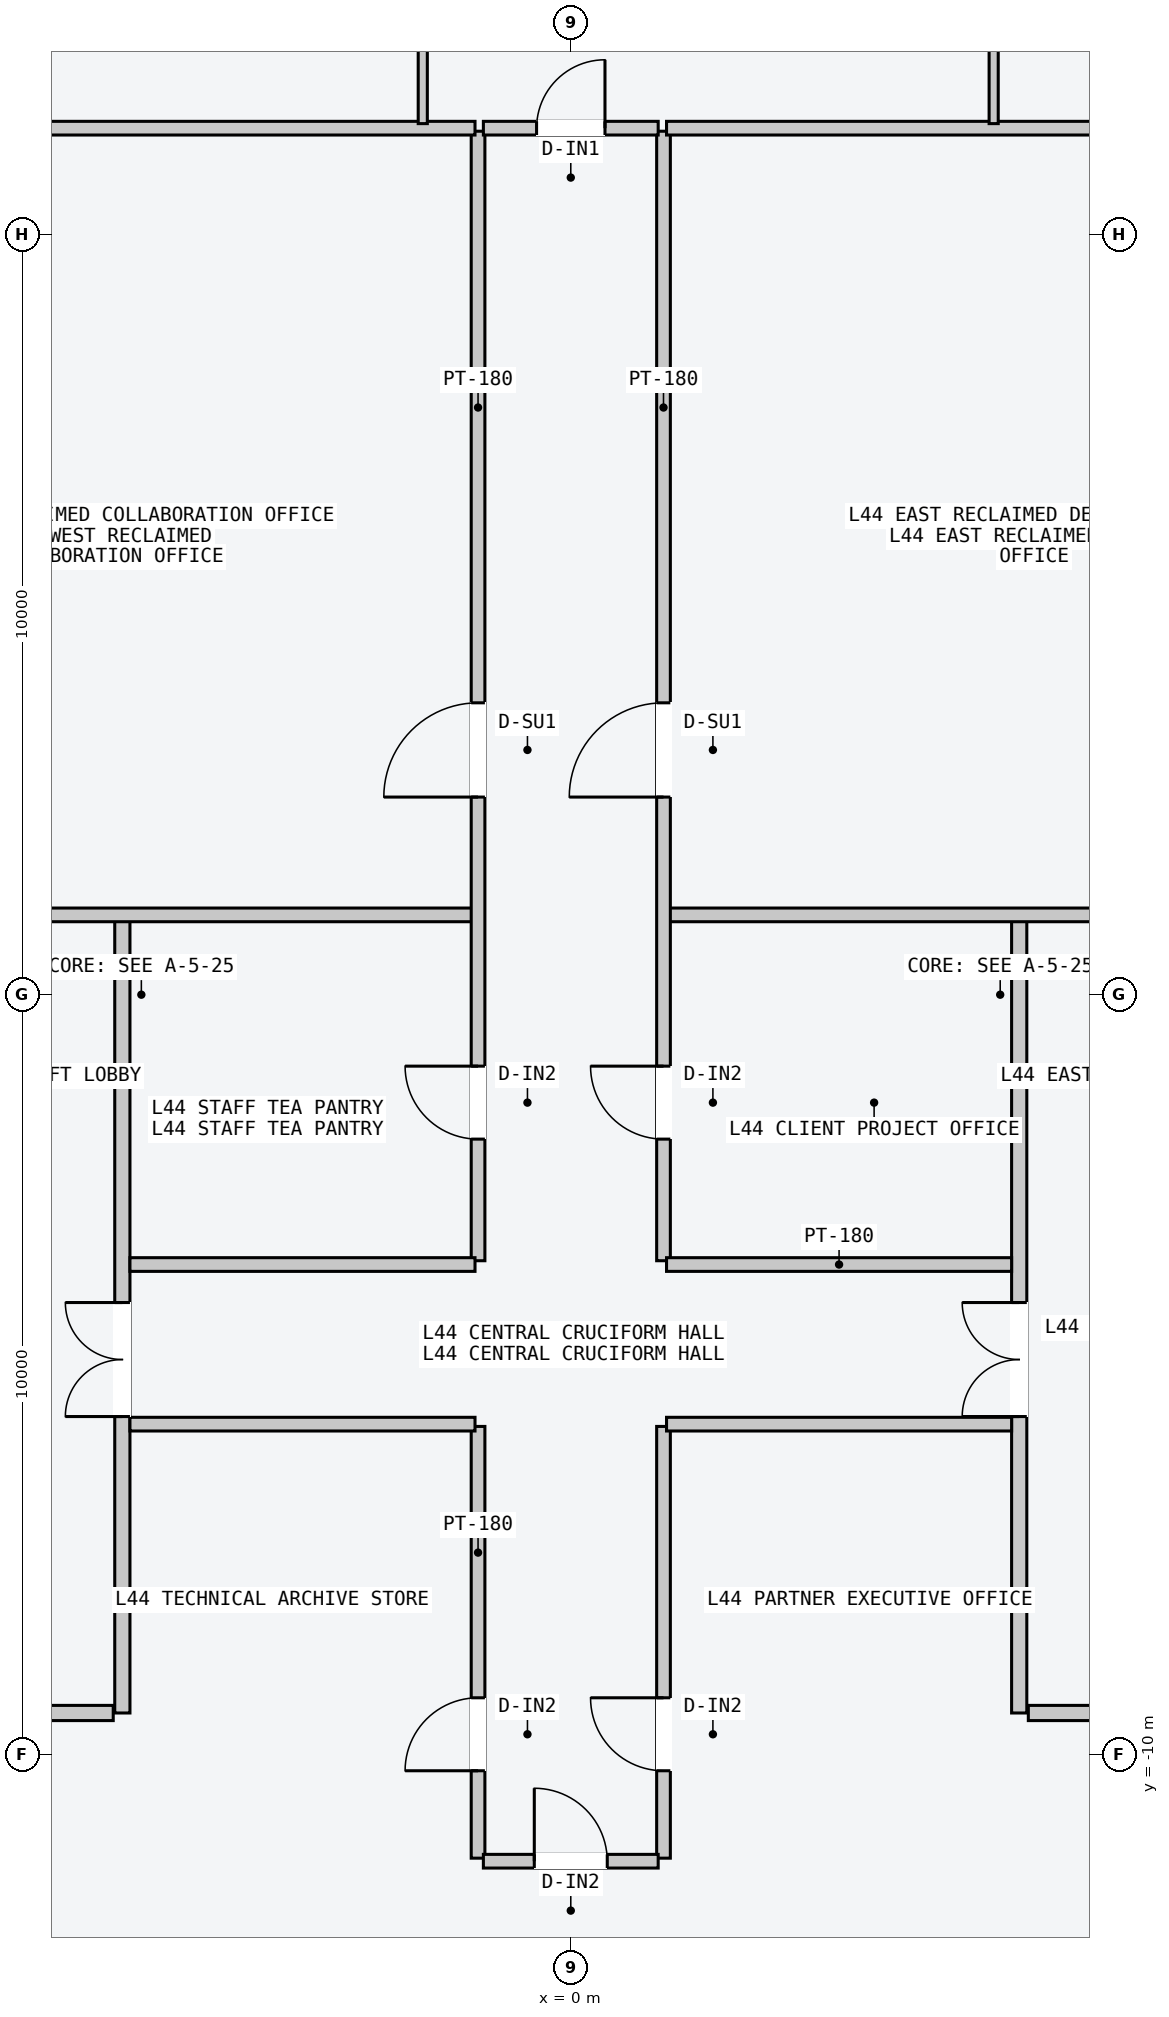
"""IFC4 building model, lengths in metres.
Left out: names, types, materials, properties, quantities, classifications, styles, units other than length and angle.
Written with IfcOpenShell. Run it as: python <this file> out.ifc"""

import sys

from ifc_helpers import new_model, si_unit, direction, frame, frame_2d, origin, place, context, subcontext, project, spatial, rectangle, extrude, element, fill, save


model = new_model("IFC4")
c1 = context("Model", 3, precision=1e-05, world=origin(), true_north=direction((0.0, 1.0)))
c2 = subcontext(c1, "Body", "Model", "MODEL_VIEW")
j1 = project(units=[si_unit("LENGTHUNIT", "METRE"), si_unit("PLANEANGLEUNIT", "RADIAN")], contexts=[c1])
p1 = place(None, origin())
s1 = spatial("IfcSite", under=j1, at=p1, CompositionType="ELEMENT")
p2 = place(p1, origin())
s2 = spatial("IfcBuilding", under=s1, at=p2, CompositionType="ELEMENT")
p3 = place(p2, frame((0.0, 0.0, 169.5)))
s3 = spatial("IfcBuildingStorey", under=s2, at=p3, CompositionType="ELEMENT", Elevation=169.5)
p4 = place(p3, frame((-5.9, -9.45, 0.0), z_axis=(0.0, 0.0, 1.0), x_axis=(0.0, 1.0, 0.0)))
e1 = element("IfcWall", 1, at=p4, inside=s3, PredefinedType="PARTITIONING", context=c2, shape_type="SweptSolid", body=[
    extrude(rectangle(XDim=10.5, YDim=0.2, at=frame_2d((5.25, 0.0))), origin(), (0.0, 0.0, 1.0), 3.4),
])
p5 = place(p4, frame((3.9, 0.0, 0.0)))
e2 = element("IfcOpeningElement", 2, at=p5, cuts=e1, PredefinedType="OPENING", context=c2, shape_type="SweptSolid", body=[
    extrude(rectangle(XDim=1.5, YDim=2.2, at=frame_2d((0.75, 1.1))), frame((0.0, 0.11, 0.0), z_axis=(0.0, -1.0, 0.0), x_axis=(1.0, 0.0, 0.0)), (0.0, 0.0, 1.0), 0.22),
])
p6 = place(p3, frame((-6.02, -9.45, 0.0), z_axis=(0.0, 0.0, 1.0), x_axis=(-1.0, 0.0, 0.0)))
e3 = element("IfcWall", 3, at=p6, inside=s3, PredefinedType="PARTITIONING", context=c2, shape_type="SweptSolid", body=[
    extrude(rectangle(XDim=1.8, YDim=0.2, at=frame_2d((0.9, 0.0))), origin(), (0.0, 0.0, 1.0), 3.4),
])
p7 = place(p3, frame((5.9, -9.45, 0.0), z_axis=(0.0, 0.0, 1.0), x_axis=(0.0, 1.0, 0.0)))
e4 = element("IfcWall", 4, at=p7, inside=s3, PredefinedType="PARTITIONING", context=c2, shape_type="SweptSolid", body=[
    extrude(rectangle(XDim=10.5, YDim=0.2, at=frame_2d((5.25, 0.0))), origin(), (0.0, 0.0, 1.0), 3.4),
])
p8 = place(p7, frame((3.9, 0.0, 0.0)))
e5 = element("IfcOpeningElement", 5, at=p8, cuts=e4, PredefinedType="OPENING", context=c2, shape_type="SweptSolid", body=[
    extrude(rectangle(XDim=1.5, YDim=2.2, at=frame_2d((0.75, 1.1))), frame((0.0, 0.11, 0.0), z_axis=(0.0, -1.0, 0.0), x_axis=(1.0, 0.0, 0.0)), (0.0, 0.0, 1.0), 0.22),
])
p9 = place(p3, frame((6.02, -9.45, 0.0), z_axis=(0.0, 0.0, 1.0), x_axis=(1.0, 0.0, 0.0)))
e6 = element("IfcWall", 6, at=p9, inside=s3, PredefinedType="PARTITIONING", context=c2, shape_type="SweptSolid", body=[
    extrude(rectangle(XDim=1.8, YDim=0.2, at=frame_2d((0.9, 0.0))), origin(), (0.0, 0.0, 1.0), 3.4),
])
p10 = place(p3, frame((-10.05, 1.05, 0.0), z_axis=(0.0, 0.0, 1.0), x_axis=(1.0, 0.0, 0.0)))
e7 = element("IfcWall", 7, at=p10, inside=s3, PredefinedType="PARTITIONING", context=c2, shape_type="SweptSolid", body=[
    extrude(rectangle(XDim=8.79, YDim=0.18, at=frame_2d((4.395, 0.0))), origin(), (0.0, 0.0, 1.0), 3.4),
])
p11 = place(p3, frame((-1.22, -3.5, 0.0), z_axis=(0.0, 0.0, 1.0), x_axis=(0.0, 1.0, 0.0)))
e8 = element("IfcWall", 8, at=p11, inside=s3, PredefinedType="PARTITIONING", context=c2, shape_type="SweptSolid", body=[
    extrude(rectangle(XDim=14.86, YDim=0.18, at=frame_2d((7.43, 0.0))), origin(), (0.0, 0.0, 1.0), 3.4),
])
p12 = place(p11, frame((6.1, 0.0, 0.0)))
e9 = element("IfcOpeningElement", 9, at=p12, cuts=e8, PredefinedType="OPENING", context=c2, shape_type="SweptSolid", body=[
    extrude(rectangle(XDim=1.24, YDim=2.24, at=frame_2d((0.62, 1.12))), frame((0.0, 0.1, 0.0), z_axis=(0.0, -1.0, 0.0), x_axis=(1.0, 0.0, 0.0)), (0.0, 0.0, 1.0), 0.2),
])
p13 = place(p11, frame((1.6, 0.0, 0.0)))
e10 = element("IfcOpeningElement", 10, at=p13, cuts=e8, PredefinedType="OPENING", context=c2, shape_type="SweptSolid", body=[
    extrude(rectangle(XDim=0.96, YDim=2.18, at=frame_2d((0.48, 1.09))), frame((0.0, 0.1, 0.0), z_axis=(0.0, -1.0, 0.0), x_axis=(1.0, 0.0, 0.0)), (0.0, 0.0, 1.0), 0.2),
])
p14 = place(p3, frame((-7.5, 11.4, 0.0), z_axis=(0.0, 0.0, 1.0), x_axis=(1.0, 0.0, 0.0)))
e11 = element("IfcWall", 11, at=p14, inside=s3, PredefinedType="PARTITIONING", context=c2, shape_type="SweptSolid", body=[
    extrude(rectangle(XDim=6.24, YDim=0.18, at=frame_2d((3.12, 0.0))), origin(), (0.0, 0.0, 1.0), 3.4),
])
p15 = place(p3, frame((-5.8, -3.55, 0.0), z_axis=(0.0, 0.0, 1.0), x_axis=(1.0, 0.0, 0.0)))
e12 = element("IfcWall", 12, at=p15, inside=s3, PredefinedType="PARTITIONING", context=c2, shape_type="SweptSolid", body=[
    extrude(rectangle(XDim=4.54, YDim=0.18, at=frame_2d((2.27, 0.0))), origin(), (0.0, 0.0, 1.0), 3.4),
])
p16 = place(p3, frame((1.26, 1.05, 0.0), z_axis=(0.0, 0.0, 1.0), x_axis=(1.0, 0.0, 0.0)))
e13 = element("IfcWall", 13, at=p16, inside=s3, PredefinedType="PARTITIONING", context=c2, shape_type="SweptSolid", body=[
    extrude(rectangle(XDim=8.8, YDim=0.18, at=frame_2d((4.4, 0.0))), origin(), (0.0, 0.0, 1.0), 3.4),
])
p17 = place(p3, frame((1.22, -3.5, 0.0), z_axis=(0.0, 0.0, 1.0), x_axis=(0.0, 1.0, 0.0)))
e14 = element("IfcWall", 14, at=p17, inside=s3, PredefinedType="PARTITIONING", context=c2, shape_type="SweptSolid", body=[
    extrude(rectangle(XDim=14.86, YDim=0.18, at=frame_2d((7.43, 0.0))), origin(), (0.0, 0.0, 1.0), 3.4),
])
p18 = place(p17, frame((6.1, 0.0, 0.0)))
e15 = element("IfcOpeningElement", 15, at=p18, cuts=e14, PredefinedType="OPENING", context=c2, shape_type="SweptSolid", body=[
    extrude(rectangle(XDim=1.24, YDim=2.24, at=frame_2d((0.62, 1.12))), frame((0.0, 0.1, 0.0), z_axis=(0.0, -1.0, 0.0), x_axis=(1.0, 0.0, 0.0)), (0.0, 0.0, 1.0), 0.2),
])
p19 = place(p17, frame((1.6, 0.0, 0.0)))
e16 = element("IfcOpeningElement", 16, at=p19, cuts=e14, PredefinedType="OPENING", context=c2, shape_type="SweptSolid", body=[
    extrude(rectangle(XDim=0.96, YDim=2.18, at=frame_2d((0.48, 1.09))), frame((0.0, 0.1, 0.0), z_axis=(0.0, -1.0, 0.0), x_axis=(1.0, 0.0, 0.0)), (0.0, 0.0, 1.0), 0.2),
])
p20 = place(p3, frame((1.26, 11.4, 0.0), z_axis=(0.0, 0.0, 1.0), x_axis=(1.0, 0.0, 0.0)))
e17 = element("IfcWall", 17, at=p20, inside=s3, PredefinedType="PARTITIONING", context=c2, shape_type="SweptSolid", body=[
    extrude(rectangle(XDim=6.24, YDim=0.18, at=frame_2d((3.12, 0.0))), origin(), (0.0, 0.0, 1.0), 3.4),
])
p21 = place(p3, frame((1.26, -3.55, 0.0), z_axis=(0.0, 0.0, 1.0), x_axis=(1.0, 0.0, 0.0)))
e18 = element("IfcWall", 18, at=p21, inside=s3, PredefinedType="PARTITIONING", context=c2, shape_type="SweptSolid", body=[
    extrude(rectangle(XDim=4.54, YDim=0.18, at=frame_2d((2.27, 0.0))), origin(), (0.0, 0.0, 1.0), 3.4),
])
p22 = place(p3, frame((-1.22, -11.36, 0.0), z_axis=(0.0, 0.0, 1.0), x_axis=(0.0, 1.0, 0.0)))
e19 = element("IfcWall", 19, at=p22, inside=s3, PredefinedType="PARTITIONING", context=c2, shape_type="SweptSolid", body=[
    extrude(rectangle(XDim=5.68, YDim=0.18, at=frame_2d((2.84, 0.0))), origin(), (0.0, 0.0, 1.0), 3.4),
])
p23 = place(p22, frame((1.15, 0.0, 0.0)))
e20 = element("IfcOpeningElement", 20, at=p23, cuts=e19, PredefinedType="OPENING", context=c2, shape_type="SweptSolid", body=[
    extrude(rectangle(XDim=0.96, YDim=2.18, at=frame_2d((0.48, 1.09))), frame((0.0, 0.1, 0.0), z_axis=(0.0, -1.0, 0.0), x_axis=(1.0, 0.0, 0.0)), (0.0, 0.0, 1.0), 0.2),
])
p24 = place(p3, frame((1.22, -11.36, 0.0), z_axis=(0.0, 0.0, 1.0), x_axis=(0.0, 1.0, 0.0)))
e21 = element("IfcWall", 21, at=p24, inside=s3, PredefinedType="PARTITIONING", context=c2, shape_type="SweptSolid", body=[
    extrude(rectangle(XDim=5.68, YDim=0.18, at=frame_2d((2.84, 0.0))), origin(), (0.0, 0.0, 1.0), 3.4),
])
p25 = place(p24, frame((1.15, 0.0, 0.0)))
e22 = element("IfcOpeningElement", 22, at=p25, cuts=e21, PredefinedType="OPENING", context=c2, shape_type="SweptSolid", body=[
    extrude(rectangle(XDim=0.96, YDim=2.18, at=frame_2d((0.48, 1.09))), frame((0.0, 0.1, 0.0), z_axis=(0.0, -1.0, 0.0), x_axis=(1.0, 0.0, 0.0)), (0.0, 0.0, 1.0), 0.2),
])
for number, where, z_axis, x_axis in (
    (23, (-5.8, -5.65, 0.0), (0.0, 0.0, 1.0), (1.0, 0.0, 0.0)),
    (24, (1.26, -5.65, 0.0), (0.0, 0.0, 1.0), (1.0, 0.0, 0.0)),
):
    element("IfcWall", number, at=place(p3, frame(where, z_axis=z_axis, x_axis=x_axis)), inside=s3, PredefinedType="PARTITIONING", context=c2, shape_type="SweptSolid", body=[
        extrude(rectangle(XDim=4.54, YDim=0.18, at=frame_2d((2.27, 0.0))), origin(), (0.0, 0.0, 1.0), 3.4),
    ])
p26 = place(p3, frame((-1.948, 11.46, 0.0), z_axis=(0.0, 0.0, 1.0), x_axis=(0.0, 1.0, 0.0)))
e25 = element("IfcWall", 25, at=p26, inside=s3, PredefinedType="PARTITIONING", context=c2, shape_type="SweptSolid", body=[
    extrude(rectangle(XDim=7.1, YDim=0.12, at=frame_2d((3.55, 0.0))), origin(), (0.0, 0.0, 1.0), 3.4),
])
p27 = place(p26, frame((1.15, 0.0, 0.0)))
e26 = element("IfcOpeningElement", 26, at=p27, cuts=e25, PredefinedType="OPENING", context=c2, shape_type="SweptSolid", body=[
    extrude(rectangle(XDim=0.96, YDim=2.18, at=frame_2d((0.48, 1.09))), frame((0.0, 0.07, 0.0), z_axis=(0.0, -1.0, 0.0), x_axis=(1.0, 0.0, 0.0)), (0.0, 0.0, 1.0), 0.14),
])
p28 = place(p3, frame((5.564, 11.46, 0.0), z_axis=(0.0, 0.0, 1.0), x_axis=(0.0, 1.0, 0.0)))
e27 = element("IfcWall", 27, at=p28, inside=s3, PredefinedType="PARTITIONING", context=c2, shape_type="SweptSolid", body=[
    extrude(rectangle(XDim=7.1, YDim=0.12, at=frame_2d((3.55, 0.0))), origin(), (0.0, 0.0, 1.0), 3.4),
])
p29 = place(p28, frame((1.15, 0.0, 0.0)))
e28 = element("IfcOpeningElement", 28, at=p29, cuts=e27, PredefinedType="OPENING", context=c2, shape_type="SweptSolid", body=[
    extrude(rectangle(XDim=0.96, YDim=2.18, at=frame_2d((0.48, 1.09))), frame((0.0, 0.07, 0.0), z_axis=(0.0, -1.0, 0.0), x_axis=(1.0, 0.0, 0.0)), (0.0, 0.0, 1.0), 0.14),
])
p30 = place(p3, frame((-1.15, 11.4, 0.0), z_axis=(0.0, 0.0, 1.0), x_axis=(1.0, 0.0, 0.0)))
e29 = element("IfcWall", 29, at=p30, inside=s3, PredefinedType="PARTITIONING", context=c2, shape_type="SweptSolid", body=[
    extrude(rectangle(XDim=2.3, YDim=0.18, at=frame_2d((1.15, 0.0))), origin(), (0.0, 0.0, 1.0), 3.4),
])
p31 = place(p30, frame((0.7, 0.0, 0.0)))
e30 = element("IfcOpeningElement", 30, at=p31, cuts=e29, PredefinedType="OPENING", context=c2, shape_type="SweptSolid", body=[
    extrude(rectangle(XDim=0.9, YDim=2.15, at=frame_2d((0.45, 1.075))), frame((0.0, 0.1, 0.0), z_axis=(0.0, -1.0, 0.0), x_axis=(1.0, 0.0, 0.0)), (0.0, 0.0, 1.0), 0.2),
])
p32 = place(p3, frame((-1.15, -11.4, 0.0), z_axis=(0.0, 0.0, 1.0), x_axis=(1.0, 0.0, 0.0)))
e31 = element("IfcWall", 31, at=p32, inside=s3, PredefinedType="PARTITIONING", context=c2, shape_type="SweptSolid", body=[
    extrude(rectangle(XDim=2.3, YDim=0.18, at=frame_2d((1.15, 0.0))), origin(), (0.0, 0.0, 1.0), 3.4),
])
p33 = place(p32, frame((0.67, 0.0, 0.0)))
e32 = element("IfcOpeningElement", 32, at=p33, cuts=e31, PredefinedType="OPENING", context=c2, shape_type="SweptSolid", body=[
    extrude(rectangle(XDim=0.96, YDim=2.18, at=frame_2d((0.48, 1.09))), frame((0.0, 0.1, 0.0), z_axis=(0.0, -1.0, 0.0), x_axis=(1.0, 0.0, 0.0)), (0.0, 0.0, 1.0), 0.2),
])
p34 = place(p5, origin())
e33 = element("IfcDoor", 33, at=p34, inside=s3, OperationType="DOUBLE_DOOR_SINGLE_SWING", PredefinedType="DOOR", context=c2, shape_type="SweptSolid", body=[
    extrude(rectangle(XDim=1.5, YDim=2.2, at=frame_2d((0.75, 1.1))), frame((0.0, 0.025, 0.0), z_axis=(0.0, -1.0, 0.0), x_axis=(1.0, 0.0, 0.0)), (0.0, 0.0, 1.0), 0.05),
])
fill(e2, e33)
p35 = place(p8, origin())
e34 = element("IfcDoor", 34, at=p35, inside=s3, OperationType="DOUBLE_DOOR_SINGLE_SWING", PredefinedType="DOOR", context=c2, shape_type="SweptSolid", body=[
    extrude(rectangle(XDim=1.5, YDim=2.2, at=frame_2d((0.75, 1.1))), frame((0.0, 0.025, 0.0), z_axis=(0.0, -1.0, 0.0), x_axis=(1.0, 0.0, 0.0)), (0.0, 0.0, 1.0), 0.05),
])
fill(e5, e34)
p36 = place(p12, origin())
e35 = element("IfcDoor", 35, at=p36, inside=s3, OperationType="SINGLE_SWING_LEFT", PredefinedType="DOOR", context=c2, shape_type="SweptSolid", body=[
    extrude(rectangle(XDim=1.24, YDim=2.24, at=frame_2d((0.62, 1.12))), frame((0.0, 0.025, 0.0), z_axis=(0.0, -1.0, 0.0), x_axis=(1.0, 0.0, 0.0)), (0.0, 0.0, 1.0), 0.05),
])
fill(e9, e35)
p37 = place(p13, origin())
e36 = element("IfcDoor", 36, at=p37, inside=s3, OperationType="SINGLE_SWING_RIGHT", PredefinedType="DOOR", context=c2, shape_type="SweptSolid", body=[
    extrude(rectangle(XDim=0.96, YDim=2.18, at=frame_2d((0.48, 1.09))), frame((0.0, 0.025, 0.0), z_axis=(0.0, -1.0, 0.0), x_axis=(1.0, 0.0, 0.0)), (0.0, 0.0, 1.0), 0.05),
])
fill(e10, e36)
p38 = place(p18, origin())
e37 = element("IfcDoor", 37, at=p38, inside=s3, OperationType="SINGLE_SWING_LEFT", PredefinedType="DOOR", context=c2, shape_type="SweptSolid", body=[
    extrude(rectangle(XDim=1.24, YDim=2.24, at=frame_2d((0.62, 1.12))), frame((0.0, 0.025, 0.0), z_axis=(0.0, -1.0, 0.0), x_axis=(1.0, 0.0, 0.0)), (0.0, 0.0, 1.0), 0.05),
])
fill(e15, e37)
p39 = place(p19, origin())
e38 = element("IfcDoor", 38, at=p39, inside=s3, OperationType="SINGLE_SWING_RIGHT", PredefinedType="DOOR", context=c2, shape_type="SweptSolid", body=[
    extrude(rectangle(XDim=0.96, YDim=2.18, at=frame_2d((0.48, 1.09))), frame((0.0, 0.025, 0.0), z_axis=(0.0, -1.0, 0.0), x_axis=(1.0, 0.0, 0.0)), (0.0, 0.0, 1.0), 0.05),
])
fill(e16, e38)
p40 = place(p23, origin())
e39 = element("IfcDoor", 39, at=p40, inside=s3, OperationType="SINGLE_SWING_LEFT", PredefinedType="DOOR", context=c2, shape_type="SweptSolid", body=[
    extrude(rectangle(XDim=0.96, YDim=2.18, at=frame_2d((0.48, 1.09))), frame((0.0, 0.025, 0.0), z_axis=(0.0, -1.0, 0.0), x_axis=(1.0, 0.0, 0.0)), (0.0, 0.0, 1.0), 0.05),
])
fill(e20, e39)
p41 = place(p25, origin())
e40 = element("IfcDoor", 40, at=p41, inside=s3, OperationType="SINGLE_SWING_RIGHT", PredefinedType="DOOR", context=c2, shape_type="SweptSolid", body=[
    extrude(rectangle(XDim=0.96, YDim=2.18, at=frame_2d((0.48, 1.09))), frame((0.0, 0.025, 0.0), z_axis=(0.0, -1.0, 0.0), x_axis=(1.0, 0.0, 0.0)), (0.0, 0.0, 1.0), 0.05),
])
fill(e22, e40)
p42 = place(p31, origin())
e41 = element("IfcDoor", 41, at=p42, inside=s3, OperationType="SINGLE_SWING_RIGHT", PredefinedType="DOOR", context=c2, shape_type="SweptSolid", body=[
    extrude(rectangle(XDim=0.9, YDim=2.15, at=frame_2d((0.45, 1.075))), frame((0.0, 0.025, 0.0), z_axis=(0.0, -1.0, 0.0), x_axis=(1.0, 0.0, 0.0)), (0.0, 0.0, 1.0), 0.05),
])
fill(e30, e41)
p43 = place(p33, origin())
e42 = element("IfcDoor", 42, at=p43, inside=s3, OperationType="SINGLE_SWING_LEFT", PredefinedType="DOOR", context=c2, shape_type="SweptSolid", body=[
    extrude(rectangle(XDim=0.96, YDim=2.18, at=frame_2d((0.48, 1.09))), frame((0.0, 0.025, 0.0), z_axis=(0.0, -1.0, 0.0), x_axis=(1.0, 0.0, 0.0)), (0.0, 0.0, 1.0), 0.05),
])
fill(e32, e42)
save(model, sys.argv[1])
